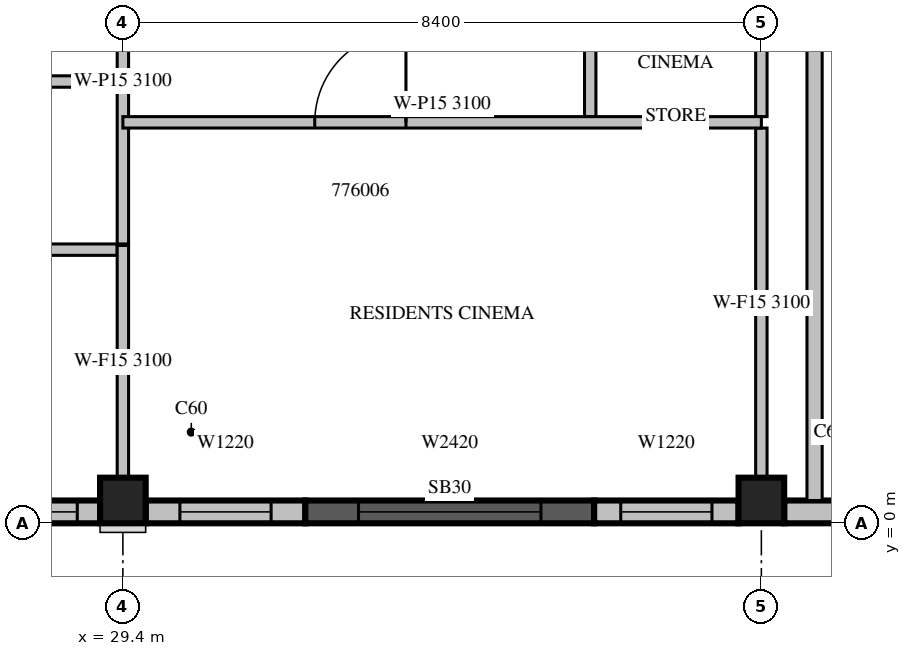
"""IFC4 building model, lengths in metres.
Left out: names, types, materials, properties, quantities, classifications, styles, units other than length and angle.
Written with IfcOpenShell. Run it as: python <this file> out.ifc"""

import sys

from ifc_helpers import new_model, si_unit, direction, frame, frame_2d, origin, origin_2d, place, context, subcontext, project, spatial, rectangle, extrude, source, transform, mapped, element, fill, save


model = new_model("IFC4")
c1 = context("Model", 3, precision=1e-05, world=origin(), true_north=direction((0.0, 1.0)))
c2 = subcontext(c1, "Body", "Model", "MODEL_VIEW")
j1 = project(units=[si_unit("LENGTHUNIT", "METRE"), si_unit("PLANEANGLEUNIT", "RADIAN")], contexts=[c1])
p1 = place(None, origin())
s1 = spatial("IfcSite", under=j1, at=p1, CompositionType="ELEMENT")
p2 = place(p1, origin())
s2 = spatial("IfcBuilding", under=s1, at=p2, CompositionType="ELEMENT")
p3 = place(p2, frame((0.0, 0.0, 326.5)))
s3 = spatial("IfcBuildingStorey", under=s2, at=p3, CompositionType="ELEMENT", Elevation=326.5)
m1 = source(origin(), c2, "Body", "SweptSolid", [
    extrude(rectangle(XDim=0.6, YDim=0.6, at=origin_2d()), origin(), (0.0, 0.0, 1.0), 3.5),
])
for number, where, z_axis, x_axis in (
    (1, (29.4, 0.3, 0.0), (0.0, 0.0, 1.0), (1.0, 0.0, 0.0)),
    (2, (37.8, 0.3, 0.0), (0.0, 0.0, 1.0), (1.0, 0.0, 0.0)),
):
    element("IfcColumn", number, at=place(p3, frame(where, z_axis=z_axis, x_axis=x_axis)), inside=s3, PredefinedType="COLUMN", context=c2, shape_type="MappedRepresentation", body=[
        mapped(m1, transform((0.0, 0.0, 0.0), scale=1.0)),
    ])
p4 = place(p3, frame((21.3, 0.15, 0.0), z_axis=(0.0, 0.0, 1.0), x_axis=(1.0, 0.0, 0.0)))
e3 = element("IfcWall", 3, at=p4, inside=s3, PredefinedType="STANDARD", context=c2, shape_type="SweptSolid", body=[
    extrude(rectangle(XDim=7.8, YDim=0.3, at=frame_2d((3.9, 0.0))), origin(), (0.0, 0.0, 1.0), 3.1),
])
m2 = source(origin(), c2, "Body", "SweptSolid", [
    extrude(rectangle(XDim=3.0, YDim=2.0, at=frame_2d((1.5, 1.0))), frame((0.0, 0.16, 0.0), z_axis=(0.0, -1.0, 0.0), x_axis=(1.0, 0.0, 0.0)), (0.0, 0.0, 1.0), 0.32),
])
p5 = place(p4, frame((0.3, 0.0, 0.6)))
e4 = element("IfcOpeningElement", 4, at=p5, cuts=e3, PredefinedType="OPENING", context=c2, shape_type="MappedRepresentation", body=[
    mapped(m2, transform((0.0, 0.0, 0.0), scale=1.0)),
])
p6 = place(p4, frame((4.5, 0.0, 0.6)))
e5 = element("IfcOpeningElement", 5, at=p6, cuts=e3, PredefinedType="OPENING", context=c2, shape_type="MappedRepresentation", body=[
    mapped(m2, transform((0.0, 0.0, 0.0), scale=1.0)),
])
p7 = place(p3, frame((29.7, 0.15, 0.0), z_axis=(0.0, 0.0, 1.0), x_axis=(1.0, 0.0, 0.0)))
e6 = element("IfcWall", 6, at=p7, inside=s3, PredefinedType="STANDARD", context=c2, shape_type="SweptSolid", body=[
    extrude(rectangle(XDim=2.1, YDim=0.3, at=frame_2d((1.05, 0.0))), origin(), (0.0, 0.0, 1.0), 3.1),
])
m3 = source(origin(), c2, "Body", "SweptSolid", [
    extrude(rectangle(XDim=1.2, YDim=2.0, at=frame_2d((0.6, 1.0))), frame((0.0, 0.16, 0.0), z_axis=(0.0, -1.0, 0.0), x_axis=(1.0, 0.0, 0.0)), (0.0, 0.0, 1.0), 0.32),
])
p8 = place(p7, frame((0.45, 0.0, 0.6)))
e7 = element("IfcOpeningElement", 7, at=p8, cuts=e6, PredefinedType="OPENING", context=c2, shape_type="MappedRepresentation", body=[
    mapped(m3, transform((0.0, 0.0, 0.0), scale=1.0)),
])
m4 = source(origin(), c2, "Body", "SweptSolid", [
    extrude(rectangle(XDim=3.8, YDim=0.3, at=frame_2d((1.9, 0.0))), origin(), (0.0, 0.0, 1.0), 3.1),
])
p9 = place(p3, frame((31.8, 0.15, 0.0), z_axis=(0.0, 0.0, 1.0), x_axis=(1.0, 0.0, 0.0)))
e8 = element("IfcWall", 8, at=p9, inside=s3, PredefinedType="SOLIDWALL", context=c2, shape_type="MappedRepresentation", body=[
    mapped(m4, transform((0.0, 0.0, 0.0), scale=1.0)),
])
m5 = source(origin(), c2, "Body", "SweptSolid", [
    extrude(rectangle(XDim=2.4, YDim=2.0, at=frame_2d((1.2, 1.0))), frame((0.0, 0.16, 0.0), z_axis=(0.0, -1.0, 0.0), x_axis=(1.0, 0.0, 0.0)), (0.0, 0.0, 1.0), 0.32),
])
p10 = place(p9, frame((0.7, 0.0, 0.6)))
e9 = element("IfcOpeningElement", 9, at=p10, cuts=e8, PredefinedType="OPENING", context=c2, shape_type="MappedRepresentation", body=[
    mapped(m5, transform((0.0, 0.0, 0.0), scale=1.0)),
])
p11 = place(p3, frame((35.6, 0.15, 0.0), z_axis=(0.0, 0.0, 1.0), x_axis=(1.0, 0.0, 0.0)))
e10 = element("IfcWall", 10, at=p11, inside=s3, PredefinedType="STANDARD", context=c2, shape_type="SweptSolid", body=[
    extrude(rectangle(XDim=1.9, YDim=0.3, at=frame_2d((0.95, 0.0))), origin(), (0.0, 0.0, 1.0), 3.1),
])
p12 = place(p11, frame((0.35, 0.0, 0.6)))
e11 = element("IfcOpeningElement", 11, at=p12, cuts=e10, PredefinedType="OPENING", context=c2, shape_type="MappedRepresentation", body=[
    mapped(m3, transform((0.0, 0.0, 0.0), scale=1.0)),
])
m6 = source(origin(), c2, "Body", "SweptSolid", [
    extrude(rectangle(XDim=2.1, YDim=0.3, at=frame_2d((1.05, 0.0))), origin(), (0.0, 0.0, 1.0), 3.1),
])
p13 = place(p3, frame((38.1, 0.15, 0.0), z_axis=(0.0, 0.0, 1.0), x_axis=(1.0, 0.0, 0.0)))
e12 = element("IfcWall", 12, at=p13, inside=s3, PredefinedType="STANDARD", context=c2, shape_type="MappedRepresentation", body=[
    mapped(m6, transform((0.0, 0.0, 0.0), scale=1.0)),
])
m7 = source(origin(), c2, "Body", "SweptSolid", [
    extrude(rectangle(XDim=8.0, YDim=0.2, at=frame_2d((4.0, 0.0))), origin(), (0.0, 0.0, 1.0), 3.1),
])
p14 = place(p3, frame((38.5, 0.3, 0.0), z_axis=(0.0, 0.0, 1.0), x_axis=(0.0, 1.0, 0.0)))
e13 = element("IfcWall", 13, at=p14, inside=s3, PredefinedType="PARTITIONING", context=c2, shape_type="MappedRepresentation", body=[
    mapped(m7, transform((0.0, 0.0, 0.0), scale=1.0)),
])
m8 = source(origin(), c2, "Body", "SweptSolid", [
    extrude(rectangle(XDim=4.275, YDim=0.15, at=frame_2d((2.138, 0.0))), origin(), (0.0, 0.0, 1.0), 3.1),
])
p15 = place(p3, frame((29.4, 3.675, 0.0), z_axis=(0.0, 0.0, 1.0), x_axis=(0.0, 1.0, 0.0)))
e14 = element("IfcWall", 14, at=p15, inside=s3, PredefinedType="PARTITIONING", context=c2, shape_type="MappedRepresentation", body=[
    mapped(m8, transform((0.0, 0.0, 0.0), scale=1.0)),
])
m9 = source(origin(), c2, "Body", "SweptSolid", [
    extrude(rectangle(XDim=5.05, YDim=0.15, at=frame_2d((2.525, 0.0))), origin(), (0.0, 0.0, 1.0), 3.1),
])
p16 = place(p3, frame((29.325, 5.812, 0.0), z_axis=(0.0, 0.0, 1.0), x_axis=(-1.0, 0.0, 0.0)))
e15 = element("IfcWall", 15, at=p16, inside=s3, PredefinedType="PARTITIONING", context=c2, shape_type="MappedRepresentation", body=[
    mapped(m9, transform((0.0, 0.0, 0.0), scale=1.0)),
])
m10 = source(origin(), c2, "Body", "SweptSolid", [
    extrude(rectangle(XDim=7.725, YDim=0.15, at=frame_2d((3.862, 0.0))), origin(), (0.0, 0.0, 1.0), 3.1),
])
p17 = place(p3, frame((21.6, 3.6, 0.0), z_axis=(0.0, 0.0, 1.0), x_axis=(1.0, 0.0, 0.0)))
e16 = element("IfcWall", 16, at=p17, inside=s3, PredefinedType="PARTITIONING", context=c2, shape_type="MappedRepresentation", body=[
    mapped(m10, transform((0.0, 0.0, 0.0), scale=1.0)),
])
m11 = source(origin(), c2, "Body", "SweptSolid", [
    extrude(rectangle(XDim=1.2, YDim=2.1, at=frame_2d((0.6, 1.05))), frame((0.0, 0.085, 0.0), z_axis=(0.0, -1.0, 0.0), x_axis=(1.0, 0.0, 0.0)), (0.0, 0.0, 1.0), 0.17),
])
p18 = place(p17, frame((0.7, 0.0, 0.0)))
e17 = element("IfcOpeningElement", 17, at=p18, cuts=e16, PredefinedType="OPENING", context=c2, shape_type="MappedRepresentation", body=[
    mapped(m11, transform((0.0, 0.0, 0.0), scale=1.0)),
])
m12 = source(origin(), c2, "Body", "SweptSolid", [
    extrude(rectangle(XDim=0.9, YDim=2.1, at=frame_2d((0.45, 1.05))), frame((0.0, 0.085, 0.0), z_axis=(0.0, -1.0, 0.0), x_axis=(1.0, 0.0, 0.0)), (0.0, 0.0, 1.0), 0.17),
])
p19 = place(p17, frame((3.413, 0.0, 0.0)))
e18 = element("IfcOpeningElement", 18, at=p19, cuts=e16, PredefinedType="OPENING", context=c2, shape_type="MappedRepresentation", body=[
    mapped(m12, transform((0.0, 0.0, 0.0), scale=1.0)),
])
m13 = source(origin(), c2, "Body", "SweptSolid", [
    extrude(rectangle(XDim=2.6, YDim=0.15, at=frame_2d((1.3, 0.0))), origin(), (0.0, 0.0, 1.0), 3.1),
])
p20 = place(p3, frame((35.548, 5.35, 0.0), z_axis=(0.0, 0.0, 1.0), x_axis=(0.0, 1.0, 0.0)))
e19 = element("IfcWall", 19, at=p20, inside=s3, PredefinedType="PARTITIONING", context=c2, shape_type="MappedRepresentation", body=[
    mapped(m13, transform((0.0, 0.0, 0.0), scale=1.0)),
])
p21 = place(p3, frame((29.4, 0.599, 0.0), z_axis=(0.0, 0.0, 1.0), x_axis=(0.0, 1.0, 0.0)))
e20 = element("IfcWall", 20, at=p21, inside=s3, PredefinedType="PARTITIONING", context=c2, shape_type="SweptSolid", body=[
    extrude(rectangle(XDim=3.056, YDim=0.15, at=frame_2d((1.528, 0.0))), origin(), (0.0, 0.0, 1.0), 3.1),
])
p22 = place(p3, frame((37.8, 0.599, 0.0), z_axis=(0.0, 0.0, 1.0), x_axis=(0.0, 1.0, 0.0)))
e21 = element("IfcWall", 21, at=p22, inside=s3, PredefinedType="PARTITIONING", context=c2, shape_type="SweptSolid", body=[
    extrude(rectangle(XDim=4.601, YDim=0.15, at=frame_2d((2.3, 0.0))), origin(), (0.0, 0.0, 1.0), 3.1),
])
p23 = place(p3, frame((37.8, 5.35, 0.0), z_axis=(0.0, 0.0, 1.0), x_axis=(0.0, 1.0, 0.0)))
e22 = element("IfcWall", 22, at=p23, inside=s3, PredefinedType="PARTITIONING", context=c2, shape_type="MappedRepresentation", body=[
    mapped(m13, transform((0.0, 0.0, 0.0), scale=1.0)),
])
m14 = source(origin(), c2, "Body", "SweptSolid", [
    extrude(rectangle(XDim=8.4, YDim=0.15, at=frame_2d((4.2, 0.0))), origin(), (0.0, 0.0, 1.0), 3.1),
])
p24 = place(p3, frame((37.8, 5.275, 0.0), z_axis=(0.0, 0.0, 1.0), x_axis=(-1.0, 0.0, 0.0)))
e23 = element("IfcWall", 23, at=p24, inside=s3, PredefinedType="PARTITIONING", context=c2, shape_type="MappedRepresentation", body=[
    mapped(m14, transform((0.0, 0.0, 0.0), scale=1.0)),
])
p25 = place(p24, frame((4.676, 0.0, 0.0)))
e24 = element("IfcOpeningElement", 24, at=p25, cuts=e23, PredefinedType="OPENING", context=c2, shape_type="MappedRepresentation", body=[
    mapped(m11, transform((0.0, 0.0, 0.0), scale=1.0)),
])
m15 = source(origin(), c2, "Body", "SweptSolid", [
    extrude(rectangle(XDim=3.0, YDim=2.0, at=frame_2d((1.5, 1.0))), frame((0.0, 0.03, 0.0), z_axis=(0.0, -1.0, 0.0), x_axis=(1.0, 0.0, 0.0)), (0.0, 0.0, 1.0), 0.06),
])
p26 = place(p6, origin())
e25 = element("IfcWindow", 25, at=p26, inside=s3, PartitioningType="SINGLE_PANEL", PredefinedType="WINDOW", context=c2, shape_type="MappedRepresentation", body=[
    mapped(m15, transform((0.0, 0.0, 0.0), scale=1.0)),
])
fill(e5, e25)
m16 = source(origin(), c2, "Body", "SweptSolid", [
    extrude(rectangle(XDim=1.2, YDim=2.0, at=frame_2d((0.6, 1.0))), frame((0.0, 0.03, 0.0), z_axis=(0.0, -1.0, 0.0), x_axis=(1.0, 0.0, 0.0)), (0.0, 0.0, 1.0), 0.06),
])
p27 = place(p8, origin())
e26 = element("IfcWindow", 26, at=p27, inside=s3, PartitioningType="SINGLE_PANEL", PredefinedType="WINDOW", context=c2, shape_type="MappedRepresentation", body=[
    mapped(m16, transform((0.0, 0.0, 0.0), scale=1.0)),
])
fill(e7, e26)
m17 = source(origin(), c2, "Body", "SweptSolid", [
    extrude(rectangle(XDim=2.4, YDim=2.0, at=frame_2d((1.2, 1.0))), frame((0.0, 0.03, 0.0), z_axis=(0.0, -1.0, 0.0), x_axis=(1.0, 0.0, 0.0)), (0.0, 0.0, 1.0), 0.06),
])
p28 = place(p10, origin())
e27 = element("IfcWindow", 27, at=p28, inside=s3, PartitioningType="SINGLE_PANEL", PredefinedType="WINDOW", context=c2, shape_type="MappedRepresentation", body=[
    mapped(m17, transform((0.0, 0.0, 0.0), scale=1.0)),
])
fill(e9, e27)
p29 = place(p12, origin())
e28 = element("IfcWindow", 28, at=p29, inside=s3, PartitioningType="SINGLE_PANEL", PredefinedType="WINDOW", context=c2, shape_type="MappedRepresentation", body=[
    mapped(m16, transform((0.0, 0.0, 0.0), scale=1.0)),
])
fill(e11, e28)
m18 = source(origin(), c2, "Body", "SweptSolid", [
    extrude(rectangle(XDim=1.2, YDim=2.1, at=frame_2d((0.6, 1.05))), frame((0.0, 0.025, 0.0), z_axis=(0.0, -1.0, 0.0), x_axis=(1.0, 0.0, 0.0)), (0.0, 0.0, 1.0), 0.05),
])
p30 = place(p25, origin())
e29 = element("IfcDoor", 29, at=p30, inside=s3, OperationType="SINGLE_SWING_RIGHT", PredefinedType="DOOR", context=c2, shape_type="MappedRepresentation", body=[
    mapped(m18, transform((0.0, 0.0, 0.0), scale=1.0)),
])
fill(e24, e29)
save(model, sys.argv[1])
